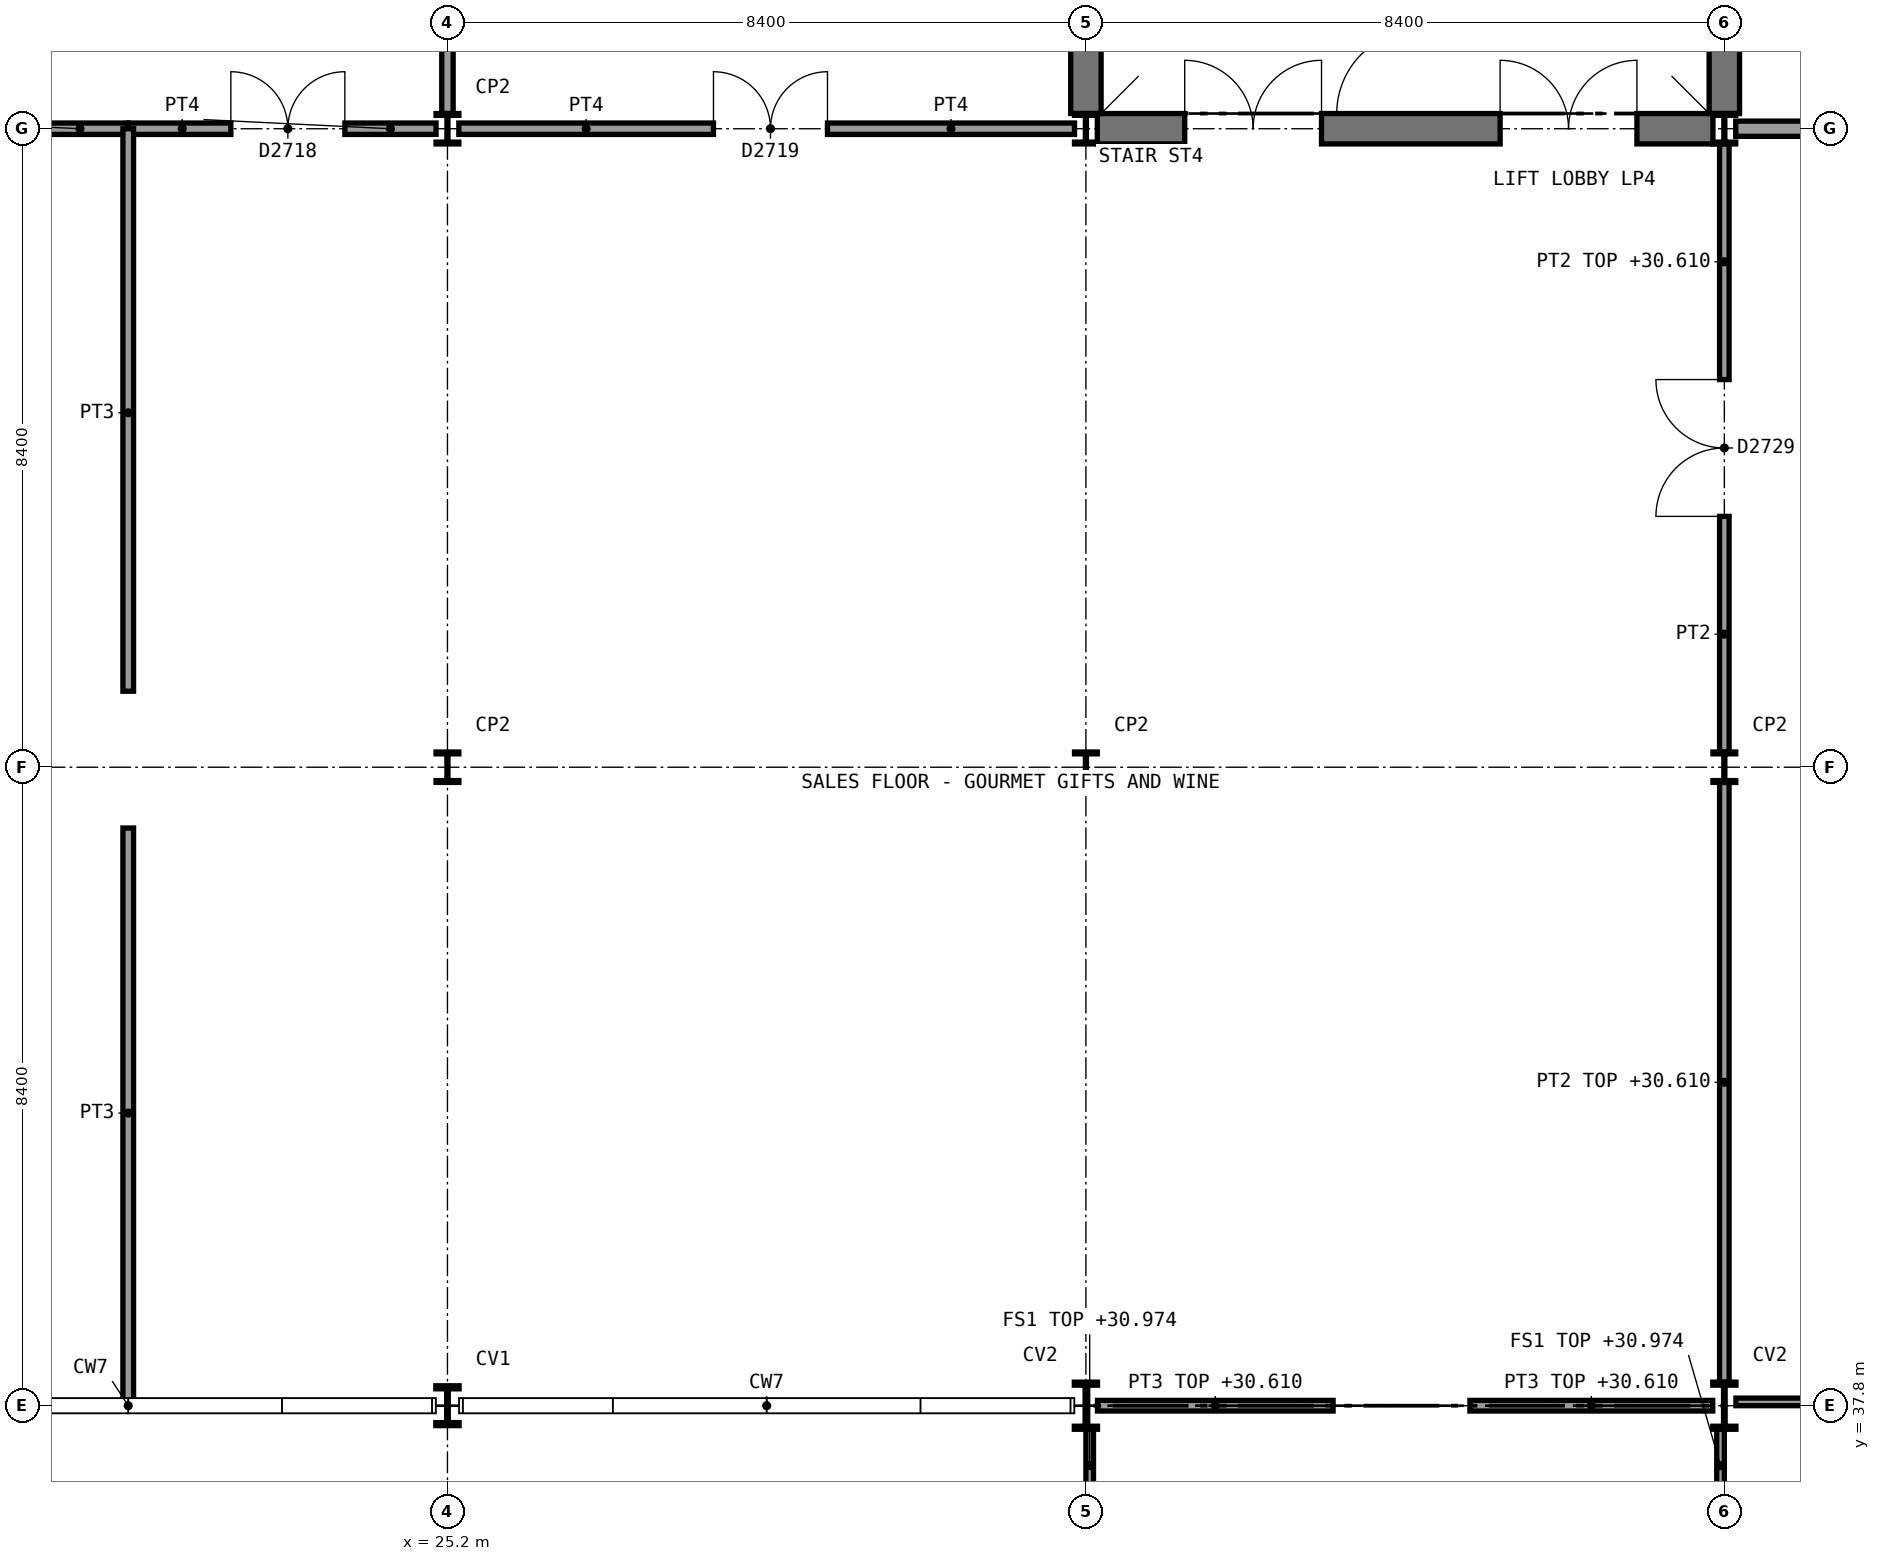
"""IFC4 building model, lengths in metres.
Left out: names, types, materials, properties, quantities, classifications, styles, units other than length and angle.
Written with IfcOpenShell. Run it as: python <this file> out.ifc"""

import sys

from ifc_helpers import new_model, si_unit, direction, frame, frame_2d, origin, origin_2d, place, context, subcontext, project, spatial, rectangle, i_section, extrude, element, fill, save


model = new_model("IFC4")
c1 = context("Model", 3, precision=1e-05, world=origin(), true_north=direction((0.0, 1.0)))
c2 = subcontext(c1, "Body", "Model", "MODEL_VIEW")
j1 = project(units=[si_unit("LENGTHUNIT", "METRE"), si_unit("PLANEANGLEUNIT", "RADIAN")], contexts=[c1])
p1 = place(None, origin())
s1 = spatial("IfcSite", under=j1, at=p1, CompositionType="ELEMENT")
p2 = place(p1, origin())
s2 = spatial("IfcBuilding", under=s1, at=p2, CompositionType="ELEMENT")
p3 = place(p2, frame((0.0, 0.0, 25.8)))
s3 = spatial("IfcBuildingStorey", under=s2, at=p3, CompositionType="ELEMENT", Elevation=25.8)
p4 = place(p3, frame((33.75, 54.6, 0.0), z_axis=(0.0, 0.0, 1.0), x_axis=(1.0, 0.0, 0.0)))
e1 = element("IfcWall", 1, at=p4, inside=s3, PredefinedType="SHEAR", context=c2, shape_type="SweptSolid", body=[
    extrude(rectangle(XDim=8.1, YDim=0.4, at=frame_2d((4.05, 0.0))), origin(), (0.0, 0.0, 1.0), 4.51),
])
p5 = place(p4, frame((1.15, 0.0, 0.0)))
e2 = element("IfcOpeningElement", 2, at=p5, cuts=e1, PredefinedType="OPENING", context=c2, shape_type="SweptSolid", body=[
    extrude(rectangle(XDim=1.8, YDim=2.1, at=frame_2d((0.9, 1.05))), frame((0.0, 0.21, 0.0), z_axis=(0.0, -1.0, 0.0), x_axis=(1.0, 0.0, 0.0)), (0.0, 0.0, 1.0), 0.42),
])
p6 = place(p4, frame((5.3, 0.0, 0.0)))
e3 = element("IfcOpeningElement", 3, at=p6, cuts=e1, PredefinedType="OPENING", context=c2, shape_type="SweptSolid", body=[
    extrude(rectangle(XDim=1.8, YDim=2.1, at=frame_2d((0.9, 1.05))), frame((0.0, 0.21, 0.0), z_axis=(0.0, -1.0, 0.0), x_axis=(1.0, 0.0, 0.0)), (0.0, 0.0, 1.0), 0.42),
])
for number, where, z_axis, x_axis in (
    (4, (33.6, 54.8, 0.0), (0.0, 0.0, 1.0), (0.0, 1.0, 0.0)),
    (5, (42.0, 54.8, 0.0), (0.0, 0.0, 1.0), (0.0, 1.0, 0.0)),
):
    element("IfcWall", number, at=place(p3, frame(where, z_axis=z_axis, x_axis=x_axis)), inside=s3, PredefinedType="SHEAR", context=c2, shape_type="SweptSolid", body=[
        extrude(rectangle(XDim=8.0, YDim=0.4, at=frame_2d((4.0, 0.0))), origin(), (0.0, 0.0, 1.0), 5.2),
    ])
p7 = place(p3, frame((25.2, 37.8, 0.0), z_axis=(0.0, 0.0, 1.0), x_axis=(1.0, 0.0, 0.0)))
e6 = element("IfcColumn", 6, at=p7, inside=s3, PredefinedType="COLUMN", context=c2, shape_type="SweptSolid", body=[
    extrude(i_section(OverallWidth=0.306, OverallDepth=0.524, WebThickness=0.021, FlangeThickness=0.04, FilletRadius=0.027, at=origin_2d()), origin(), (0.0, 0.0, 1.0), 5.4),
])
for number, where, z_axis, x_axis in (
    (7, (25.2, 46.2, 0.0), (0.0, 0.0, 1.0), (1.0, 0.0, 0.0)),
    (8, (25.2, 54.6, 0.0), (0.0, 0.0, 1.0), (1.0, 0.0, 0.0)),
):
    element("IfcColumn", number, at=place(p3, frame(where, z_axis=z_axis, x_axis=x_axis)), inside=s3, PredefinedType="COLUMN", context=c2, shape_type="SweptSolid", body=[
        extrude(i_section(OverallWidth=0.3, OverallDepth=0.4, WebThickness=0.013, FlangeThickness=0.024, FilletRadius=0.027, at=origin_2d()), origin(), (0.0, 0.0, 1.0), 5.4),
    ])
p8 = place(p3, frame((33.6, 37.8, 0.0), z_axis=(0.0, 0.0, 1.0), x_axis=(1.0, 0.0, 0.0)))
e9 = element("IfcColumn", 9, at=p8, inside=s3, PredefinedType="COLUMN", context=c2, shape_type="SweptSolid", body=[
    extrude(i_section(OverallWidth=0.305, OverallDepth=0.62, WebThickness=0.021, FlangeThickness=0.04, FilletRadius=0.027, at=origin_2d()), origin(), (0.0, 0.0, 1.0), 5.4),
])
for number, where, z_axis, x_axis in (
    (10, (33.6, 46.2, 0.0), (0.0, 0.0, 1.0), (1.0, 0.0, 0.0)),
    (11, (33.6, 54.6, 0.0), (0.0, 0.0, 1.0), (1.0, 0.0, 0.0)),
):
    element("IfcColumn", number, at=place(p3, frame(where, z_axis=z_axis, x_axis=x_axis)), inside=s3, PredefinedType="COLUMN", context=c2, shape_type="SweptSolid", body=[
        extrude(i_section(OverallWidth=0.3, OverallDepth=0.4, WebThickness=0.013, FlangeThickness=0.024, FilletRadius=0.027, at=origin_2d()), origin(), (0.0, 0.0, 1.0), 5.4),
    ])
p9 = place(p3, frame((42.0, 37.8, 0.0), z_axis=(0.0, 0.0, 1.0), x_axis=(1.0, 0.0, 0.0)))
e12 = element("IfcColumn", 12, at=p9, inside=s3, PredefinedType="COLUMN", context=c2, shape_type="SweptSolid", body=[
    extrude(i_section(OverallWidth=0.305, OverallDepth=0.62, WebThickness=0.021, FlangeThickness=0.04, FilletRadius=0.027, at=origin_2d()), origin(), (0.0, 0.0, 1.0), 5.4),
])
for number, where, z_axis, x_axis in (
    (13, (42.0, 46.2, 0.0), (0.0, 0.0, 1.0), (1.0, 0.0, 0.0)),
    (14, (42.0, 54.6, 0.0), (0.0, 0.0, 1.0), (1.0, 0.0, 0.0)),
):
    element("IfcColumn", number, at=place(p3, frame(where, z_axis=z_axis, x_axis=x_axis)), inside=s3, PredefinedType="COLUMN", context=c2, shape_type="SweptSolid", body=[
        extrude(i_section(OverallWidth=0.3, OverallDepth=0.4, WebThickness=0.013, FlangeThickness=0.024, FilletRadius=0.027, at=origin_2d()), origin(), (0.0, 0.0, 1.0), 5.4),
    ])
p10 = place(p3, frame((25.2, 54.8, 0.0), z_axis=(0.0, 0.0, 1.0), x_axis=(0.0, 1.0, 0.0)))
e15 = element("IfcWall", 15, at=p10, inside=s3, PredefinedType="SOLIDWALL", context=c2, shape_type="SweptSolid", body=[
    extrude(rectangle(XDim=8.0, YDim=0.15, at=frame_2d((4.0, 0.0))), origin(), (0.0, 0.0, 1.0), 4.81),
])
p11 = place(p3, frame((16.95, 54.6, 0.0), z_axis=(0.0, 0.0, 1.0), x_axis=(1.0, 0.0, 0.0)))
e16 = element("IfcWall", 16, at=p11, inside=s3, PredefinedType="SOLIDWALL", context=c2, shape_type="SweptSolid", body=[
    extrude(rectangle(XDim=4.05, YDim=0.15, at=frame_2d((2.025, 0.0))), origin(), (0.0, 0.0, 1.0), 4.89),
])
p12 = place(p11, frame((1.35, 0.0, 0.0)))
e17 = element("IfcOpeningElement", 17, at=p12, cuts=e16, PredefinedType="OPENING", context=c2, shape_type="SweptSolid", body=[
    extrude(rectangle(XDim=1.5, YDim=2.1, at=frame_2d((0.75, 1.05))), frame((0.0, 0.085, 0.0), z_axis=(0.0, -1.0, 0.0), x_axis=(1.0, 0.0, 0.0)), (0.0, 0.0, 1.0), 0.17),
])
p13 = place(p3, frame((21.0, 54.6, 0.0), z_axis=(0.0, 0.0, 1.0), x_axis=(1.0, 0.0, 0.0)))
e18 = element("IfcWall", 18, at=p13, inside=s3, PredefinedType="SOLIDWALL", context=c2, shape_type="SweptSolid", body=[
    extrude(rectangle(XDim=4.05, YDim=0.15, at=frame_2d((2.025, 0.0))), origin(), (0.0, 0.0, 1.0), 4.89),
])
p14 = place(p13, frame((1.35, 0.0, 0.0)))
e19 = element("IfcOpeningElement", 19, at=p14, cuts=e18, PredefinedType="OPENING", context=c2, shape_type="SweptSolid", body=[
    extrude(rectangle(XDim=1.5, YDim=2.1, at=frame_2d((0.75, 1.05))), frame((0.0, 0.085, 0.0), z_axis=(0.0, -1.0, 0.0), x_axis=(1.0, 0.0, 0.0)), (0.0, 0.0, 1.0), 0.17),
])
p15 = place(p3, frame((25.35, 54.6, 0.0), z_axis=(0.0, 0.0, 1.0), x_axis=(1.0, 0.0, 0.0)))
e20 = element("IfcWall", 20, at=p15, inside=s3, PredefinedType="SOLIDWALL", context=c2, shape_type="SweptSolid", body=[
    extrude(rectangle(XDim=8.1, YDim=0.15, at=frame_2d((4.05, 0.0))), origin(), (0.0, 0.0, 1.0), 4.89),
])
p16 = place(p15, frame((3.35, 0.0, 0.0)))
e21 = element("IfcOpeningElement", 21, at=p16, cuts=e20, PredefinedType="OPENING", context=c2, shape_type="SweptSolid", body=[
    extrude(rectangle(XDim=1.5, YDim=2.1, at=frame_2d((0.75, 1.05))), frame((0.0, 0.085, 0.0), z_axis=(0.0, -1.0, 0.0), x_axis=(1.0, 0.0, 0.0)), (0.0, 0.0, 1.0), 0.17),
])
p17 = place(p3, frame((42.15, 54.6, 0.0), z_axis=(0.0, 0.0, 1.0), x_axis=(1.0, 0.0, 0.0)))
e22 = element("IfcWall", 22, at=p17, inside=s3, PredefinedType="SOLIDWALL", context=c2, shape_type="SweptSolid", body=[
    extrude(rectangle(XDim=8.1, YDim=0.2, at=frame_2d((4.05, 0.0))), origin(), (0.0, 0.0, 1.0), 4.89),
])
p18 = place(p17, frame((3.35, 0.0, 0.0)))
e23 = element("IfcOpeningElement", 23, at=p18, cuts=e22, PredefinedType="OPENING", context=c2, shape_type="SweptSolid", body=[
    extrude(rectangle(XDim=1.2, YDim=2.1, at=frame_2d((0.6, 1.05))), frame((0.0, 0.11, 0.0), z_axis=(0.0, -1.0, 0.0), x_axis=(1.0, 0.0, 0.0)), (0.0, 0.0, 1.0), 0.22),
])
p19 = place(p3, frame((21.0, 37.8, 0.0), z_axis=(0.0, 0.0, 1.0), x_axis=(0.0, 1.0, 0.0)))
e24 = element("IfcWall", 24, at=p19, inside=s3, PredefinedType="PARTITIONING", context=c2, shape_type="SweptSolid", body=[
    extrude(rectangle(XDim=7.6, YDim=0.14, at=frame_2d((3.8, 0.0))), origin(), (0.0, 0.0, 1.0), 5.2),
])
p20 = place(p3, frame((21.0, 47.2, 0.0), z_axis=(0.0, 0.0, 1.0), x_axis=(0.0, 1.0, 0.0)))
e25 = element("IfcWall", 25, at=p20, inside=s3, PredefinedType="PARTITIONING", context=c2, shape_type="SweptSolid", body=[
    extrude(rectangle(XDim=7.4, YDim=0.14, at=frame_2d((3.7, 0.0))), origin(), (0.0, 0.0, 1.0), 5.2),
])
p21 = place(p3, frame((42.0, 38.11, 0.0), z_axis=(0.0, 0.0, 1.0), x_axis=(0.0, 1.0, 0.0)))
e26 = element("IfcWall", 26, at=p21, inside=s3, PredefinedType="PARTITIONING", context=c2, shape_type="SweptSolid", body=[
    extrude(rectangle(XDim=7.89, YDim=0.125, at=frame_2d((3.945, 0.0))), origin(), (0.0, 0.0, 1.0), 4.81),
])
p22 = place(p3, frame((42.0, 46.4, 0.0), z_axis=(0.0, 0.0, 1.0), x_axis=(0.0, 1.0, 0.0)))
e27 = element("IfcWall", 27, at=p22, inside=s3, PredefinedType="PARTITIONING", context=c2, shape_type="SweptSolid", body=[
    extrude(rectangle(XDim=8.0, YDim=0.125, at=frame_2d((4.0, 0.0))), origin(), (0.0, 0.0, 1.0), 4.81),
])
p23 = place(p22, frame((3.1, 0.0, 0.0)))
e28 = element("IfcOpeningElement", 28, at=p23, cuts=e27, PredefinedType="OPENING", context=c2, shape_type="SweptSolid", body=[
    extrude(rectangle(XDim=1.8, YDim=2.1, at=frame_2d((0.9, 1.05))), frame((0.0, 0.073, 0.0), z_axis=(0.0, -1.0, 0.0), x_axis=(1.0, 0.0, 0.0)), (0.0, 0.0, 1.0), 0.145),
])
p24 = place(p3, frame((33.753, 37.8, 0.0), z_axis=(0.0, 0.0, 1.0), x_axis=(1.0, 0.0, 0.0)))
e29 = element("IfcWall", 29, at=p24, inside=s3, PredefinedType="PARTITIONING", context=c2, shape_type="SweptSolid", body=[
    extrude(rectangle(XDim=3.1, YDim=0.14, at=frame_2d((1.55, 0.0))), origin(), (0.0, 0.0, 1.0), 4.81),
])
p25 = place(p3, frame((38.653, 37.8, 0.0), z_axis=(0.0, 0.0, 1.0), x_axis=(1.0, 0.0, 0.0)))
e30 = element("IfcWall", 30, at=p25, inside=s3, PredefinedType="PARTITIONING", context=c2, shape_type="SweptSolid", body=[
    extrude(rectangle(XDim=3.195, YDim=0.14, at=frame_2d((1.597, 0.0))), origin(), (0.0, 0.0, 1.0), 4.81),
])
p26 = place(p3, frame((38.0, 62.8, 0.0), z_axis=(0.0, 0.0, 1.0), x_axis=(0.0, -1.0, 0.0)))
e31 = element("IfcWall", 31, at=p26, inside=s3, PredefinedType="SHEAR", context=c2, shape_type="SweptSolid", body=[
    extrude(rectangle(XDim=8.0, YDim=0.2, at=frame_2d((4.0, 0.0))), origin(), (0.0, 0.0, 1.0), 5.2),
])
p27 = place(p26, frame((6.9, 0.0, 0.0)))
e32 = element("IfcOpeningElement", 32, at=p27, cuts=e31, PredefinedType="OPENING", context=c2, shape_type="SweptSolid", body=[
    extrude(rectangle(XDim=1.11, YDim=2.1, at=frame_2d((0.555, 1.05))), frame((0.0, 0.11, 0.0), z_axis=(0.0, -1.0, 0.0), x_axis=(1.0, 0.0, 0.0)), (0.0, 0.0, 1.0), 0.22),
])
p28 = place(p3, frame((42.153, 37.85, 0.0), z_axis=(0.0, 0.0, 1.0), x_axis=(1.0, 0.0, 0.0)))
e33 = element("IfcWall", 33, at=p28, inside=s3, PredefinedType="PARTITIONING", context=c2, shape_type="SweptSolid", body=[
    extrude(rectangle(XDim=8.094, YDim=0.1, at=frame_2d((4.047, 0.0))), origin(), (0.0, 0.0, 1.0), 4.81),
])
for number, where, z_axis, x_axis in (
    (34, (33.65, 25.51, 0.0), (0.0, 0.0, 1.0), (0.0, 1.0, 0.0)),
    (35, (41.95, 25.51, 0.0), (0.0, 0.0, 1.0), (0.0, 1.0, 0.0)),
):
    element("IfcWall", number, at=place(p3, frame(where, z_axis=z_axis, x_axis=x_axis)), inside=s3, PredefinedType="PARTITIONING", context=c2, shape_type="SweptSolid", body=[
        extrude(rectangle(XDim=11.98, YDim=0.1, at=frame_2d((5.99, 0.0))), origin(), (0.0, 0.0, 1.0), 5.174),
    ])
p29 = place(p14, origin())
e36 = element("IfcDoor", 36, at=p29, inside=s3, OperationType="DOUBLE_DOOR_SINGLE_SWING", PredefinedType="DOOR", context=c2, shape_type="SweptSolid", body=[
    extrude(rectangle(XDim=1.5, YDim=2.1, at=frame_2d((0.75, 1.05))), frame((0.0, 0.025, 0.0), z_axis=(0.0, -1.0, 0.0), x_axis=(1.0, 0.0, 0.0)), (0.0, 0.0, 1.0), 0.05),
])
fill(e19, e36)
p30 = place(p16, origin())
e37 = element("IfcDoor", 37, at=p30, inside=s3, OperationType="DOUBLE_DOOR_SINGLE_SWING", PredefinedType="DOOR", context=c2, shape_type="SweptSolid", body=[
    extrude(rectangle(XDim=1.5, YDim=2.1, at=frame_2d((0.75, 1.05))), frame((0.0, 0.025, 0.0), z_axis=(0.0, -1.0, 0.0), x_axis=(1.0, 0.0, 0.0)), (0.0, 0.0, 1.0), 0.05),
])
fill(e21, e37)
p31 = place(p23, origin())
e38 = element("IfcDoor", 38, at=p31, inside=s3, OperationType="DOUBLE_DOOR_SINGLE_SWING", PredefinedType="DOOR", context=c2, shape_type="SweptSolid", body=[
    extrude(rectangle(XDim=1.8, YDim=2.1, at=frame_2d((0.9, 1.05))), frame((0.0, 0.025, 0.0), z_axis=(0.0, -1.0, 0.0), x_axis=(1.0, 0.0, 0.0)), (0.0, 0.0, 1.0), 0.05),
])
fill(e28, e38)
p32 = place(p27, frame((1.1, 0.0, 0.0), z_axis=(0.0, 0.0, 1.0), x_axis=(-1.0, 0.0, 0.0)))
e39 = element("IfcDoor", 39, at=p32, inside=s3, OperationType="SINGLE_SWING_LEFT", PredefinedType="DOOR", context=c2, shape_type="SweptSolid", body=[
    extrude(rectangle(XDim=1.1, YDim=2.1, at=frame_2d((0.55, 1.05))), frame((0.0, 0.025, 0.0), z_axis=(0.0, -1.0, 0.0), x_axis=(1.0, 0.0, 0.0)), (0.0, 0.0, 1.0), 0.05),
])
fill(e32, e39)
p33 = place(p5, origin())
e40 = element("IfcDoor", 40, at=p33, inside=s3, OperationType="DOUBLE_DOOR_SINGLE_SWING", PredefinedType="DOOR", context=c2, shape_type="SweptSolid", body=[
    extrude(rectangle(XDim=1.8, YDim=2.1, at=frame_2d((0.9, 1.05))), frame((0.0, 0.025, 0.0), z_axis=(0.0, -1.0, 0.0), x_axis=(1.0, 0.0, 0.0)), (0.0, 0.0, 1.0), 0.05),
])
fill(e2, e40)
p34 = place(p6, origin())
e41 = element("IfcDoor", 41, at=p34, inside=s3, OperationType="DOUBLE_DOOR_SINGLE_SWING", PredefinedType="DOOR", context=c2, shape_type="SweptSolid", body=[
    extrude(rectangle(XDim=1.8, YDim=2.1, at=frame_2d((0.9, 1.05))), frame((0.0, 0.025, 0.0), z_axis=(0.0, -1.0, 0.0), x_axis=(1.0, 0.0, 0.0)), (0.0, 0.0, 1.0), 0.05),
])
fill(e3, e41)
save(model, sys.argv[1])
